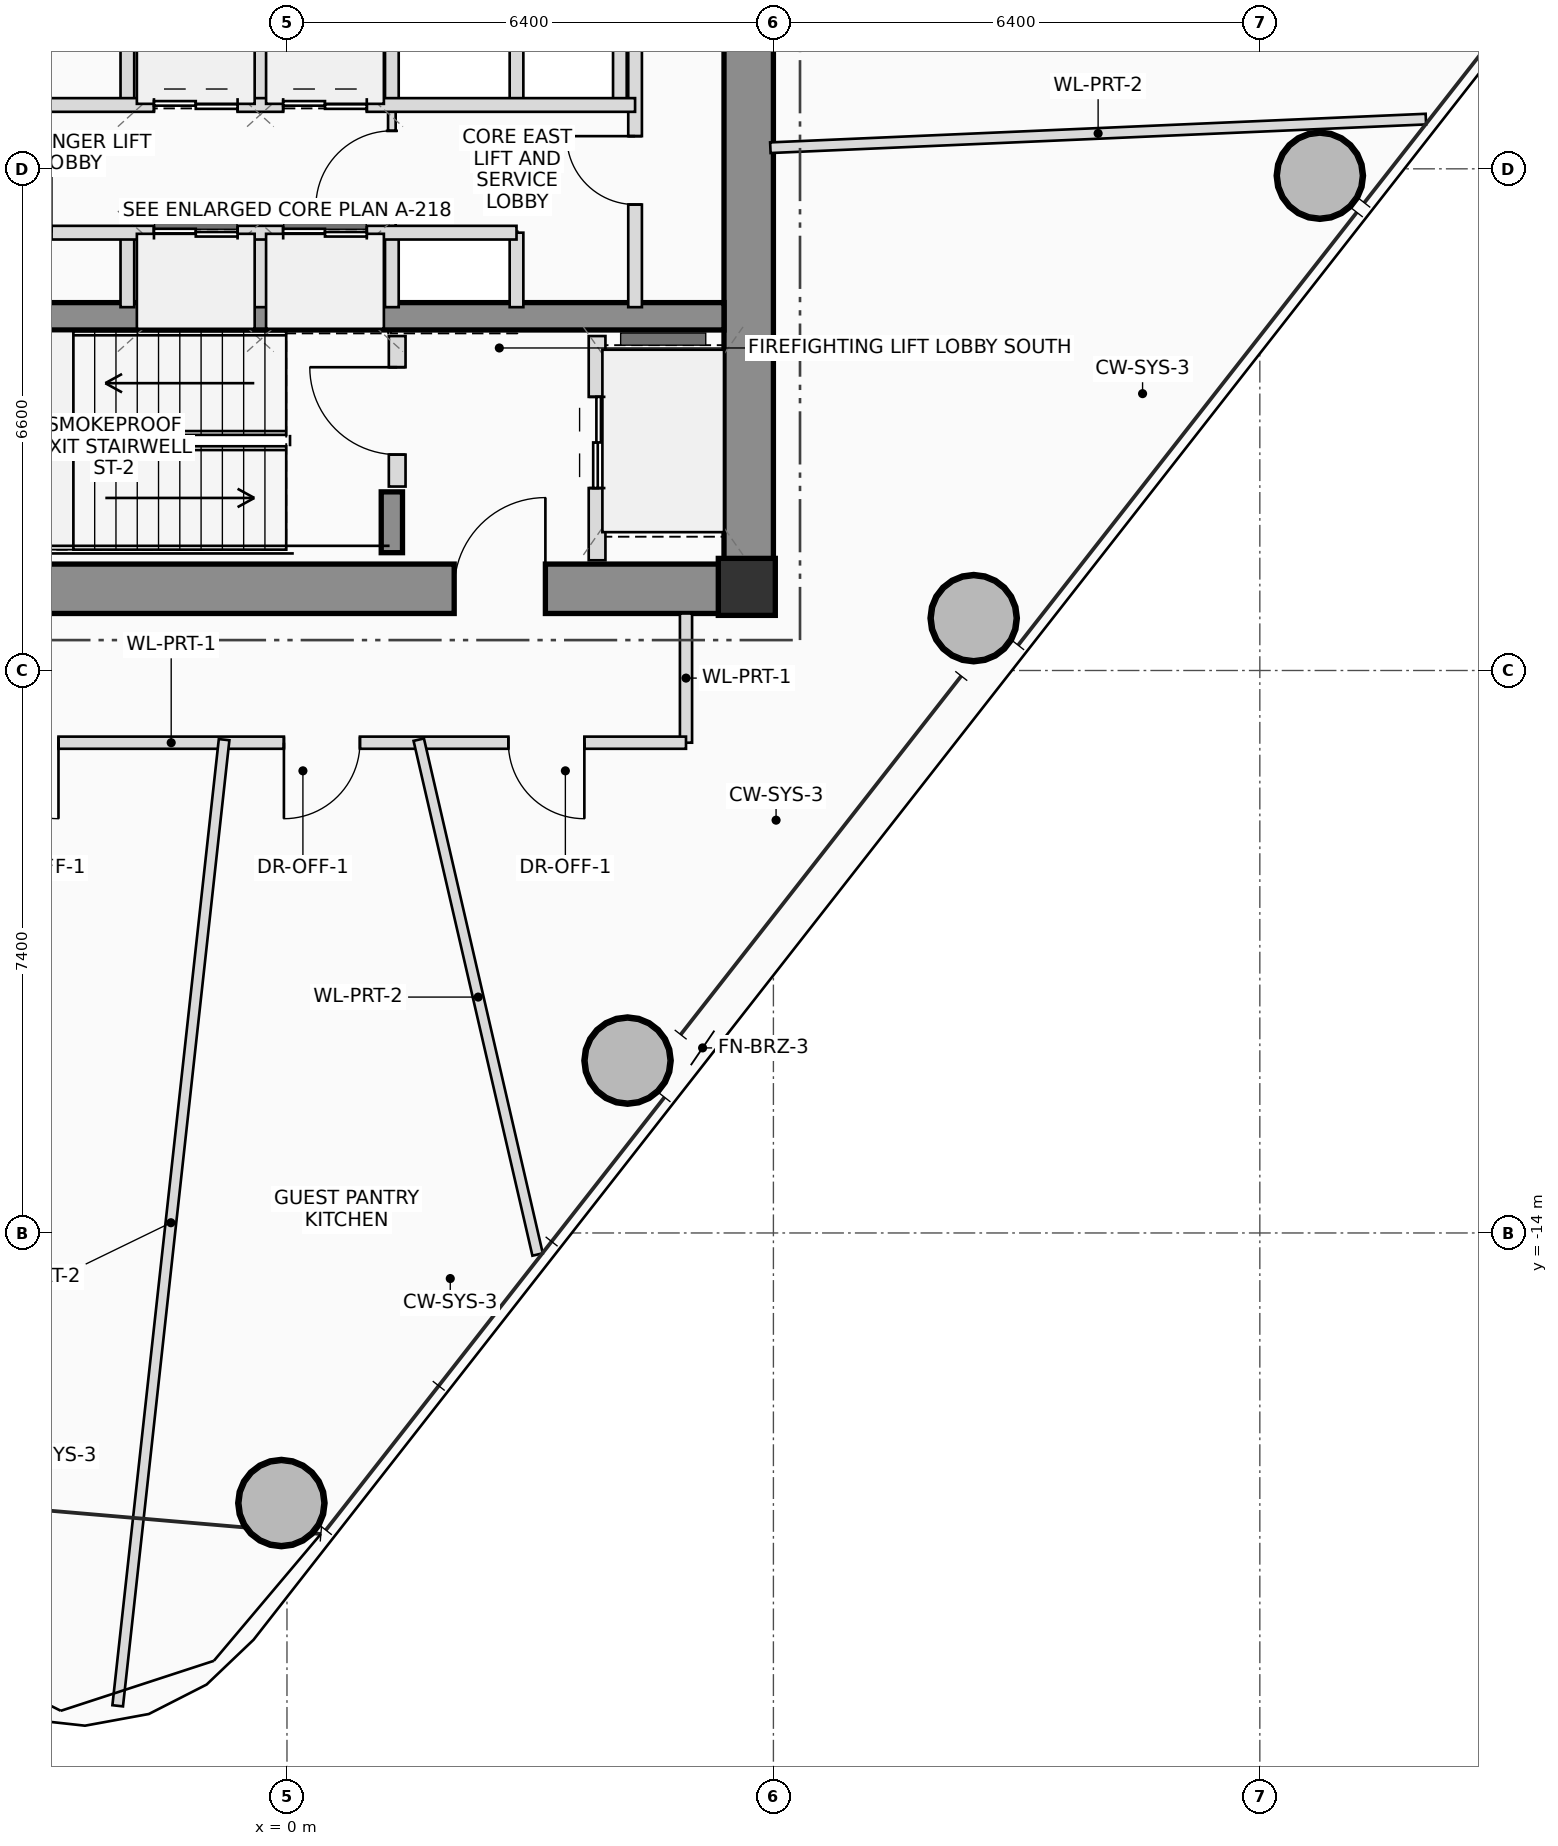
"""IFC4 building model, lengths in metres.
Left out: names, types, materials, properties, quantities, classifications, styles, units other than length and angle.
Written with IfcOpenShell. Run it as: python <this file> out.ifc"""

import sys

from ifc_helpers import new_model, si_unit, direction, frame, frame_2d, origin, origin_2d, place, context, subcontext, project, spatial, rectangle, hollow_circle, extrude, source, transform, mapped, element, fill, save


model = new_model("IFC4")
c1 = context("Model", 3, precision=1e-05, world=origin(), true_north=direction((0.0, 1.0)))
c2 = subcontext(c1, "Body", "Model", "MODEL_VIEW")
j1 = project(units=[si_unit("LENGTHUNIT", "METRE"), si_unit("PLANEANGLEUNIT", "RADIAN")], contexts=[c1])
p1 = place(None, origin())
s1 = spatial("IfcSite", under=j1, at=p1, CompositionType="ELEMENT")
p2 = place(p1, origin())
s2 = spatial("IfcBuilding", under=s1, at=p2, CompositionType="ELEMENT")
p3 = place(p2, frame((0.0, 0.0, 208.7)))
s3 = spatial("IfcBuildingStorey", under=s2, at=p3, CompositionType="ELEMENT", Elevation=208.7)
m1 = source(origin(), c2, "Body", "SweptSolid", [
    extrude(rectangle(XDim=0.75, YDim=0.75, at=origin_2d()), origin(), (0.0, 0.0, 1.0), 3.45),
])
p4 = place(p3, frame((6.05, -5.5, 0.0), z_axis=(0.0, 0.0, 1.0), x_axis=(1.0, 0.0, 0.0)))
e1 = element("IfcColumn", 1, at=p4, inside=s3, PredefinedType="COLUMN", context=c2, shape_type="MappedRepresentation", body=[
    mapped(m1, transform((0.0, 0.0, 0.0), scale=1.0)),
])
p5 = place(p3, frame((-6.4, -5.525, 0.0), z_axis=(0.0, 0.0, 1.0), x_axis=(1.0, 0.0, 0.0)))
e2 = element("IfcWall", 2, at=p5, inside=s3, PredefinedType="SHEAR", context=c2, shape_type="SweptSolid", body=[
    extrude(rectangle(XDim=12.8, YDim=0.65, at=frame_2d((6.4, 0.0))), origin(), (0.0, 0.0, 1.0), 3.45),
])
p6 = place(p5, frame((8.6, 0.0, 0.0)))
e3 = element("IfcOpeningElement", 3, at=p6, cuts=e2, PredefinedType="OPENING", context=c2, shape_type="SweptSolid", body=[
    extrude(rectangle(XDim=1.2, YDim=2.2, at=frame_2d((0.6, 1.1))), frame((0.0, 0.335, 0.0), z_axis=(0.0, -1.0, 0.0), x_axis=(1.0, 0.0, 0.0)), (0.0, 0.0, 1.0), 0.67),
])
p7 = place(p3, frame((6.075, -5.2, 0.0), z_axis=(0.0, 0.0, 1.0), x_axis=(0.0, 1.0, 0.0)))
e4 = element("IfcWall", 4, at=p7, inside=s3, PredefinedType="SHEAR", context=c2, shape_type="SweptSolid", body=[
    extrude(rectangle(XDim=10.4, YDim=0.65, at=frame_2d((5.2, 0.0))), origin(), (0.0, 0.0, 1.0), 3.45),
])
p8 = place(p3, frame((-5.75, -1.94, 0.0), z_axis=(0.0, 0.0, 1.0), x_axis=(1.0, 0.0, 0.0)))
e5 = element("IfcWall", 5, at=p8, inside=s3, PredefinedType="SHEAR", context=c2, shape_type="SweptSolid", body=[
    extrude(rectangle(XDim=11.5, YDim=0.36, at=frame_2d((5.75, 0.0))), origin(), (0.0, 0.0, 1.0), 3.45),
])
p9 = place(p3, frame((1.38, -5.05, 0.0), z_axis=(0.0, 0.0, 1.0), x_axis=(0.0, 1.0, 0.0)))
e6 = element("IfcWall", 6, at=p9, inside=s3, PredefinedType="SHEAR", context=c2, shape_type="SweptSolid", body=[
    extrude(rectangle(XDim=0.8, YDim=0.28, at=frame_2d((0.4, 0.0))), origin(), (0.0, 0.0, 1.0), 3.45),
])
m2 = source(origin(), c2, "Body", "SweptSolid", [
    extrude(hollow_circle(Radius=0.575, WallThickness=0.042, at=origin_2d()), origin(), (0.0, 0.0, 1.0), 3.45),
])
for number, where, z_axis, x_axis in (
    (7, (-0.073, -17.553, 0.0), (0.0, 0.0, 1.0), (1.0, 0.0, 0.0)),
    (8, (4.481, -11.732, 0.0), (0.0, 0.0, 1.0), (1.0, 0.0, 0.0)),
    (9, (9.035, -5.911, 0.0), (0.0, 0.0, 1.0), (1.0, 0.0, 0.0)),
    (10, (13.59, -0.09, 0.0), (0.0, 0.0, 1.0), (1.0, 0.0, 0.0)),
):
    element("IfcColumn", number, at=place(p3, frame(where, z_axis=z_axis, x_axis=x_axis)), inside=s3, PredefinedType="COLUMN", context=c2, shape_type="MappedRepresentation", body=[
        mapped(m2, transform((0.0, 0.0, 0.0), scale=1.0)),
    ])
p10 = place(p3, frame((1.45, -4.18, 0.0), z_axis=(0.0, 0.0, 1.0), x_axis=(0.0, 1.0, 0.0)))
e11 = element("IfcWall", 11, at=p10, inside=s3, PredefinedType="PLUMBINGWALL", context=c2, shape_type="SweptSolid", body=[
    extrude(rectangle(XDim=1.98, YDim=0.22, at=frame_2d((0.99, 0.0))), origin(), (0.0, 0.0, 1.0), 3.25),
])
p11 = place(p10, frame((0.42, 0.0, 0.0)))
e12 = element("IfcOpeningElement", 12, at=p11, cuts=e11, PredefinedType="OPENING", context=c2, shape_type="SweptSolid", body=[
    extrude(rectangle(XDim=1.15, YDim=2.15, at=frame_2d((0.575, 1.075))), frame((0.0, 0.12, 0.0), z_axis=(0.0, -1.0, 0.0), x_axis=(1.0, 0.0, 0.0)), (0.0, 0.0, 1.0), 0.24),
])
p12 = place(p3, frame((4.08, -5.15, 0.0), z_axis=(0.0, 0.0, 1.0), x_axis=(0.0, 1.0, 0.0)))
e13 = element("IfcWall", 13, at=p12, inside=s3, PredefinedType="PLUMBINGWALL", context=c2, shape_type="SweptSolid", body=[
    extrude(rectangle(XDim=2.95, YDim=0.22, at=frame_2d((1.475, 0.0))), origin(), (0.0, 0.0, 1.0), 3.25),
])
p13 = place(p12, frame((0.95, 0.0, 0.0)))
e14 = element("IfcOpeningElement", 14, at=p13, cuts=e13, PredefinedType="OPENING", context=c2, shape_type="SweptSolid", body=[
    extrude(rectangle(XDim=1.2, YDim=2.25, at=frame_2d((0.6, 1.125))), frame((0.0, 0.12, 0.0), z_axis=(0.0, -1.0, 0.0), x_axis=(1.0, 0.0, 0.0)), (0.0, 0.0, 1.0), 0.24),
])
p14 = place(p3, frame((1.38, -0.84, 0.0), z_axis=(0.0, 0.0, 1.0), x_axis=(0.0, 1.0, 0.0)))
e15 = element("IfcWall", 15, at=p14, inside=s3, PredefinedType="PARTITIONING", context=c2, shape_type="SweptSolid", body=[
    extrude(rectangle(XDim=1.68, YDim=0.1, at=frame_2d((0.84, 0.0))), origin(), (0.0, 0.0, 1.0), 3.25),
])
p15 = place(p14, frame((0.34, 0.0, 0.0)))
e16 = element("IfcOpeningElement", 16, at=p15, cuts=e15, PredefinedType="OPENING", context=c2, shape_type="SweptSolid", body=[
    extrude(rectangle(XDim=1.0, YDim=2.25, at=frame_2d((0.5, 1.125))), frame((0.0, 0.06, 0.0), z_axis=(0.0, -1.0, 0.0), x_axis=(1.0, 0.0, 0.0)), (0.0, 0.0, 1.0), 0.12),
])
for number, where, z_axis, x_axis in (
    (17, (-2.1, 0.84, 0.0), (0.0, 0.0, 1.0), (0.0, 1.0, 0.0)),
    (18, (-2.1, -1.82, 0.0), (0.0, 0.0, 1.0), (0.0, 1.0, 0.0)),
    (19, (-0.35, 0.84, 0.0), (0.0, 0.0, 1.0), (0.0, 1.0, 0.0)),
    (20, (-0.35, -1.82, 0.0), (0.0, 0.0, 1.0), (0.0, 1.0, 0.0)),
    (21, (1.38, 0.84, 0.0), (0.0, 0.0, 1.0), (0.0, 1.0, 0.0)),
    (22, (1.38, -1.82, 0.0), (0.0, 0.0, 1.0), (0.0, 1.0, 0.0)),
    (23, (3.02, 0.84, 0.0), (0.0, 0.0, 1.0), (0.0, 1.0, 0.0)),
    (24, (4.38, 0.84, 0.0), (0.0, 0.0, 1.0), (0.0, 1.0, 0.0)),
    (25, (3.02, -1.82, 0.0), (0.0, 0.0, 1.0), (0.0, 1.0, 0.0)),
):
    element("IfcWall", number, at=place(p3, frame(where, z_axis=z_axis, x_axis=x_axis)), inside=s3, PredefinedType="PLUMBINGWALL", context=c2, shape_type="SweptSolid", body=[
        extrude(rectangle(XDim=0.98, YDim=0.18, at=frame_2d((0.49, 0.0))), origin(), (0.0, 0.0, 1.0), 3.25),
    ])
p16 = place(p3, frame((4.58, -1.82, 0.0), z_axis=(0.0, 0.0, 1.0), x_axis=(0.0, 1.0, 0.0)))
e26 = element("IfcWall", 26, at=p16, inside=s3, PredefinedType="PLUMBINGWALL", context=c2, shape_type="SweptSolid", body=[
    extrude(rectangle(XDim=3.64, YDim=0.18, at=frame_2d((1.82, 0.0))), origin(), (0.0, 0.0, 1.0), 3.25),
])
p17 = place(p16, frame((1.35, 0.0, 0.0)))
e27 = element("IfcOpeningElement", 27, at=p17, cuts=e26, PredefinedType="OPENING", context=c2, shape_type="SweptSolid", body=[
    extrude(rectangle(XDim=0.9, YDim=2.05, at=frame_2d((0.45, 1.025))), frame((0.0, 0.1, 0.0), z_axis=(0.0, -1.0, 0.0), x_axis=(1.0, 0.0, 0.0)), (0.0, 0.0, 1.0), 0.2),
])
p18 = place(p3, frame((-5.68, 0.84, 0.0), z_axis=(0.0, 0.0, 1.0), x_axis=(1.0, 0.0, 0.0)))
e28 = element("IfcWall", 28, at=p18, inside=s3, PredefinedType="PLUMBINGWALL", context=c2, shape_type="SweptSolid", body=[
    extrude(rectangle(XDim=10.26, YDim=0.18, at=frame_2d((5.13, 0.0))), origin(), (0.0, 0.0, 1.0), 3.25),
])
p19 = place(p18, frame((1.08, 0.0, 0.0)))
e29 = element("IfcOpeningElement", 29, at=p19, cuts=e28, PredefinedType="OPENING", context=c2, shape_type="SweptSolid", body=[
    extrude(rectangle(XDim=0.9, YDim=2.05, at=frame_2d((0.45, 1.025))), frame((0.0, 0.1, 0.0), z_axis=(0.0, -1.0, 0.0), x_axis=(1.0, 0.0, 0.0)), (0.0, 0.0, 1.0), 0.2),
])
p20 = place(p18, frame((3.93, 0.0, 0.0)))
e30 = element("IfcOpeningElement", 30, at=p20, cuts=e28, PredefinedType="OPENING", context=c2, shape_type="SweptSolid", body=[
    extrude(rectangle(XDim=1.1, YDim=2.2, at=frame_2d((0.55, 1.1))), frame((0.0, 0.1, 0.0), z_axis=(0.0, -1.0, 0.0), x_axis=(1.0, 0.0, 0.0)), (0.0, 0.0, 1.0), 0.2),
])
p21 = place(p18, frame((5.63, 0.0, 0.0)))
e31 = element("IfcOpeningElement", 31, at=p21, cuts=e28, PredefinedType="OPENING", context=c2, shape_type="SweptSolid", body=[
    extrude(rectangle(XDim=1.1, YDim=2.2, at=frame_2d((0.55, 1.1))), frame((0.0, 0.1, 0.0), z_axis=(0.0, -1.0, 0.0), x_axis=(1.0, 0.0, 0.0)), (0.0, 0.0, 1.0), 0.2),
])
p22 = place(p3, frame((-5.68, -0.84, 0.0), z_axis=(0.0, 0.0, 1.0), x_axis=(1.0, 0.0, 0.0)))
e32 = element("IfcWall", 32, at=p22, inside=s3, PredefinedType="PLUMBINGWALL", context=c2, shape_type="SweptSolid", body=[
    extrude(rectangle(XDim=8.7, YDim=0.18, at=frame_2d((4.35, 0.0))), origin(), (0.0, 0.0, 1.0), 3.25),
])
p23 = place(p22, frame((1.68, 0.0, 0.0)))
e33 = element("IfcOpeningElement", 33, at=p23, cuts=e32, PredefinedType="OPENING", context=c2, shape_type="SweptSolid", body=[
    extrude(rectangle(XDim=0.9, YDim=2.05, at=frame_2d((0.45, 1.025))), frame((0.0, 0.1, 0.0), z_axis=(0.0, -1.0, 0.0), x_axis=(1.0, 0.0, 0.0)), (0.0, 0.0, 1.0), 0.2),
])
p24 = place(p22, frame((3.93, 0.0, 0.0)))
e34 = element("IfcOpeningElement", 34, at=p24, cuts=e32, PredefinedType="OPENING", context=c2, shape_type="SweptSolid", body=[
    extrude(rectangle(XDim=1.1, YDim=2.2, at=frame_2d((0.55, 1.1))), frame((0.0, 0.1, 0.0), z_axis=(0.0, -1.0, 0.0), x_axis=(1.0, 0.0, 0.0)), (0.0, 0.0, 1.0), 0.2),
])
p25 = place(p22, frame((5.63, 0.0, 0.0)))
e35 = element("IfcOpeningElement", 35, at=p25, cuts=e32, PredefinedType="OPENING", context=c2, shape_type="SweptSolid", body=[
    extrude(rectangle(XDim=1.1, YDim=2.2, at=frame_2d((0.55, 1.1))), frame((0.0, 0.1, 0.0), z_axis=(0.0, -1.0, 0.0), x_axis=(1.0, 0.0, 0.0)), (0.0, 0.0, 1.0), 0.2),
])
p26 = place(p3, frame((5.25, -5.85, 0.0), z_axis=(0.0, 0.0, 1.0), x_axis=(0.0, -1.0, 0.0)))
e36 = element("IfcWall", 36, at=p26, inside=s3, PredefinedType="PARTITIONING", context=c2, shape_type="SweptSolid", body=[
    extrude(rectangle(XDim=1.7, YDim=0.16, at=frame_2d((0.85, 0.0))), origin(), (0.0, 0.0, 1.0), 3.25),
])
p27 = place(p3, frame((5.25, -7.55, 0.0), z_axis=(0.0, 0.0, 1.0), x_axis=(-1.0, 0.0, 0.0)))
e37 = element("IfcWall", 37, at=p27, inside=s3, PredefinedType="PARTITIONING", context=c2, shape_type="SweptSolid", body=[
    extrude(rectangle(XDim=11.61, YDim=0.16, at=frame_2d((5.805, 0.0))), origin(), (0.0, 0.0, 1.0), 2.605),
])
p28 = place(p27, frame((1.337, 0.0, 0.0)))
e38 = element("IfcOpeningElement", 38, at=p28, cuts=e37, PredefinedType="OPENING", context=c2, shape_type="SweptSolid", body=[
    extrude(rectangle(XDim=1.0, YDim=2.25, at=frame_2d((0.5, 1.125))), frame((0.0, 0.09, 0.0), z_axis=(0.0, -1.0, 0.0), x_axis=(1.0, 0.0, 0.0)), (0.0, 0.0, 1.0), 0.18),
])
p29 = place(p27, frame((4.29, 0.0, 0.0)))
e39 = element("IfcOpeningElement", 39, at=p29, cuts=e37, PredefinedType="OPENING", context=c2, shape_type="SweptSolid", body=[
    extrude(rectangle(XDim=1.0, YDim=2.25, at=frame_2d((0.5, 1.125))), frame((0.0, 0.09, 0.0), z_axis=(0.0, -1.0, 0.0), x_axis=(1.0, 0.0, 0.0)), (0.0, 0.0, 1.0), 0.18),
])
p30 = place(p27, frame((8.256, 0.0, 0.0)))
e40 = element("IfcOpeningElement", 40, at=p30, cuts=e37, PredefinedType="OPENING", context=c2, shape_type="SweptSolid", body=[
    extrude(rectangle(XDim=1.0, YDim=2.25, at=frame_2d((0.5, 1.125))), frame((0.0, 0.09, 0.0), z_axis=(0.0, -1.0, 0.0), x_axis=(1.0, 0.0, 0.0)), (0.0, 0.0, 1.0), 0.18),
])
p31 = place(p3, frame((6.36, 0.278, 0.0), z_axis=(0.0, 0.0, 1.0), x_axis=(0.999047440648, 0.043637270025, 0.0)))
e41 = element("IfcWall", 41, at=p31, inside=s3, PredefinedType="PARTITIONING", context=c2, shape_type="SweptSolid", body=[
    extrude(rectangle(XDim=8.633, YDim=0.14, at=frame_2d((4.316, 0.0))), origin(), (0.0, 0.0, 1.0), 2.605),
])
p32 = place(p3, frame((-0.827, -7.51, 0.0), z_axis=(0.0, 0.0, 1.0), x_axis=(-0.109492708445, -0.993987598915, 0.0)))
e42 = element("IfcWall", 42, at=p32, inside=s3, PredefinedType="PARTITIONING", context=c2, shape_type="SweptSolid", body=[
    extrude(rectangle(XDim=12.788, YDim=0.14, at=frame_2d((6.394, 0.0))), origin(), (0.0, 0.0, 1.0), 2.605),
])
p33 = place(p3, frame((1.734, -7.51, 0.0), z_axis=(0.0, 0.0, 1.0), x_axis=(0.224951847052, -0.974369881774, 0.0)))
e43 = element("IfcWall", 43, at=p33, inside=s3, PredefinedType="PARTITIONING", context=c2, shape_type="SweptSolid", body=[
    extrude(rectangle(XDim=6.951, YDim=0.14, at=frame_2d((3.476, 0.0))), origin(), (0.0, 0.0, 1.0), 2.765),
])
p34 = place(p6, origin())
e44 = element("IfcDoor", 44, at=p34, inside=s3, OperationType="SINGLE_SWING_RIGHT", PredefinedType="DOOR", context=c2, shape_type="SweptSolid", body=[
    extrude(rectangle(XDim=1.2, YDim=2.2, at=frame_2d((0.6, 1.1))), frame((0.0, 0.025, 0.0), z_axis=(0.0, -1.0, 0.0), x_axis=(1.0, 0.0, 0.0)), (0.0, 0.0, 1.0), 0.05),
])
fill(e3, e44)
p35 = place(p11, origin())
e45 = element("IfcDoor", 45, at=p35, inside=s3, OperationType="SINGLE_SWING_RIGHT", PredefinedType="DOOR", context=c2, shape_type="SweptSolid", body=[
    extrude(rectangle(XDim=1.15, YDim=2.15, at=frame_2d((0.575, 1.075))), frame((0.0, 0.025, 0.0), z_axis=(0.0, -1.0, 0.0), x_axis=(1.0, 0.0, 0.0)), (0.0, 0.0, 1.0), 0.05),
])
fill(e12, e45)
p36 = place(p13, origin())
e46 = element("IfcDoor", 46, at=p36, inside=s3, OperationType="DOUBLE_DOOR_SLIDING", PredefinedType="DOOR", context=c2, shape_type="SweptSolid", body=[
    extrude(rectangle(XDim=1.2, YDim=2.25, at=frame_2d((0.6, 1.125))), frame((0.0, 0.025, 0.0), z_axis=(0.0, -1.0, 0.0), x_axis=(1.0, 0.0, 0.0)), (0.0, 0.0, 1.0), 0.05),
])
fill(e14, e46)
p37 = place(p15, origin())
e47 = element("IfcDoor", 47, at=p37, inside=s3, OperationType="SINGLE_SWING_LEFT", PredefinedType="DOOR", context=c2, shape_type="SweptSolid", body=[
    extrude(rectangle(XDim=1.0, YDim=2.25, at=frame_2d((0.5, 1.125))), frame((0.0, 0.025, 0.0), z_axis=(0.0, -1.0, 0.0), x_axis=(1.0, 0.0, 0.0)), (0.0, 0.0, 1.0), 0.05),
])
fill(e16, e47)
p38 = place(p17, origin())
e48 = element("IfcDoor", 48, at=p38, inside=s3, OperationType="SINGLE_SWING_RIGHT", PredefinedType="DOOR", context=c2, shape_type="SweptSolid", body=[
    extrude(rectangle(XDim=0.9, YDim=2.05, at=frame_2d((0.45, 1.025))), frame((0.0, 0.025, 0.0), z_axis=(0.0, -1.0, 0.0), x_axis=(1.0, 0.0, 0.0)), (0.0, 0.0, 1.0), 0.05),
])
fill(e27, e48)
p39 = place(p20, origin())
e49 = element("IfcDoor", 49, at=p39, inside=s3, OperationType="DOUBLE_DOOR_SLIDING", PredefinedType="DOOR", context=c2, shape_type="SweptSolid", body=[
    extrude(rectangle(XDim=1.1, YDim=2.2, at=frame_2d((0.55, 1.1))), frame((0.0, 0.025, 0.0), z_axis=(0.0, -1.0, 0.0), x_axis=(1.0, 0.0, 0.0)), (0.0, 0.0, 1.0), 0.05),
])
fill(e30, e49)
p40 = place(p21, origin())
e50 = element("IfcDoor", 50, at=p40, inside=s3, OperationType="DOUBLE_DOOR_SLIDING", PredefinedType="DOOR", context=c2, shape_type="SweptSolid", body=[
    extrude(rectangle(XDim=1.1, YDim=2.2, at=frame_2d((0.55, 1.1))), frame((0.0, 0.025, 0.0), z_axis=(0.0, -1.0, 0.0), x_axis=(1.0, 0.0, 0.0)), (0.0, 0.0, 1.0), 0.05),
])
fill(e31, e50)
p41 = place(p24, origin())
e51 = element("IfcDoor", 51, at=p41, inside=s3, OperationType="DOUBLE_DOOR_SLIDING", PredefinedType="DOOR", context=c2, shape_type="SweptSolid", body=[
    extrude(rectangle(XDim=1.1, YDim=2.2, at=frame_2d((0.55, 1.1))), frame((0.0, 0.025, 0.0), z_axis=(0.0, -1.0, 0.0), x_axis=(1.0, 0.0, 0.0)), (0.0, 0.0, 1.0), 0.05),
])
fill(e34, e51)
p42 = place(p25, origin())
e52 = element("IfcDoor", 52, at=p42, inside=s3, OperationType="DOUBLE_DOOR_SLIDING", PredefinedType="DOOR", context=c2, shape_type="SweptSolid", body=[
    extrude(rectangle(XDim=1.1, YDim=2.2, at=frame_2d((0.55, 1.1))), frame((0.0, 0.025, 0.0), z_axis=(0.0, -1.0, 0.0), x_axis=(1.0, 0.0, 0.0)), (0.0, 0.0, 1.0), 0.05),
])
fill(e35, e52)
p43 = place(p28, origin())
e53 = element("IfcDoor", 53, at=p43, inside=s3, OperationType="SINGLE_SWING_LEFT", PredefinedType="DOOR", context=c2, shape_type="SweptSolid", body=[
    extrude(rectangle(XDim=1.0, YDim=2.25, at=frame_2d((0.5, 1.125))), frame((0.0, 0.025, 0.0), z_axis=(0.0, -1.0, 0.0), x_axis=(1.0, 0.0, 0.0)), (0.0, 0.0, 1.0), 0.05),
])
fill(e38, e53)
p44 = place(p29, origin())
e54 = element("IfcDoor", 54, at=p44, inside=s3, OperationType="SINGLE_SWING_RIGHT", PredefinedType="DOOR", context=c2, shape_type="SweptSolid", body=[
    extrude(rectangle(XDim=1.0, YDim=2.25, at=frame_2d((0.5, 1.125))), frame((0.0, 0.025, 0.0), z_axis=(0.0, -1.0, 0.0), x_axis=(1.0, 0.0, 0.0)), (0.0, 0.0, 1.0), 0.05),
])
fill(e39, e54)
p45 = place(p30, origin())
e55 = element("IfcDoor", 55, at=p45, inside=s3, OperationType="SINGLE_SWING_LEFT", PredefinedType="DOOR", context=c2, shape_type="SweptSolid", body=[
    extrude(rectangle(XDim=1.0, YDim=2.25, at=frame_2d((0.5, 1.125))), frame((0.0, 0.025, 0.0), z_axis=(0.0, -1.0, 0.0), x_axis=(1.0, 0.0, 0.0)), (0.0, 0.0, 1.0), 0.05),
])
fill(e40, e55)
save(model, sys.argv[1])
